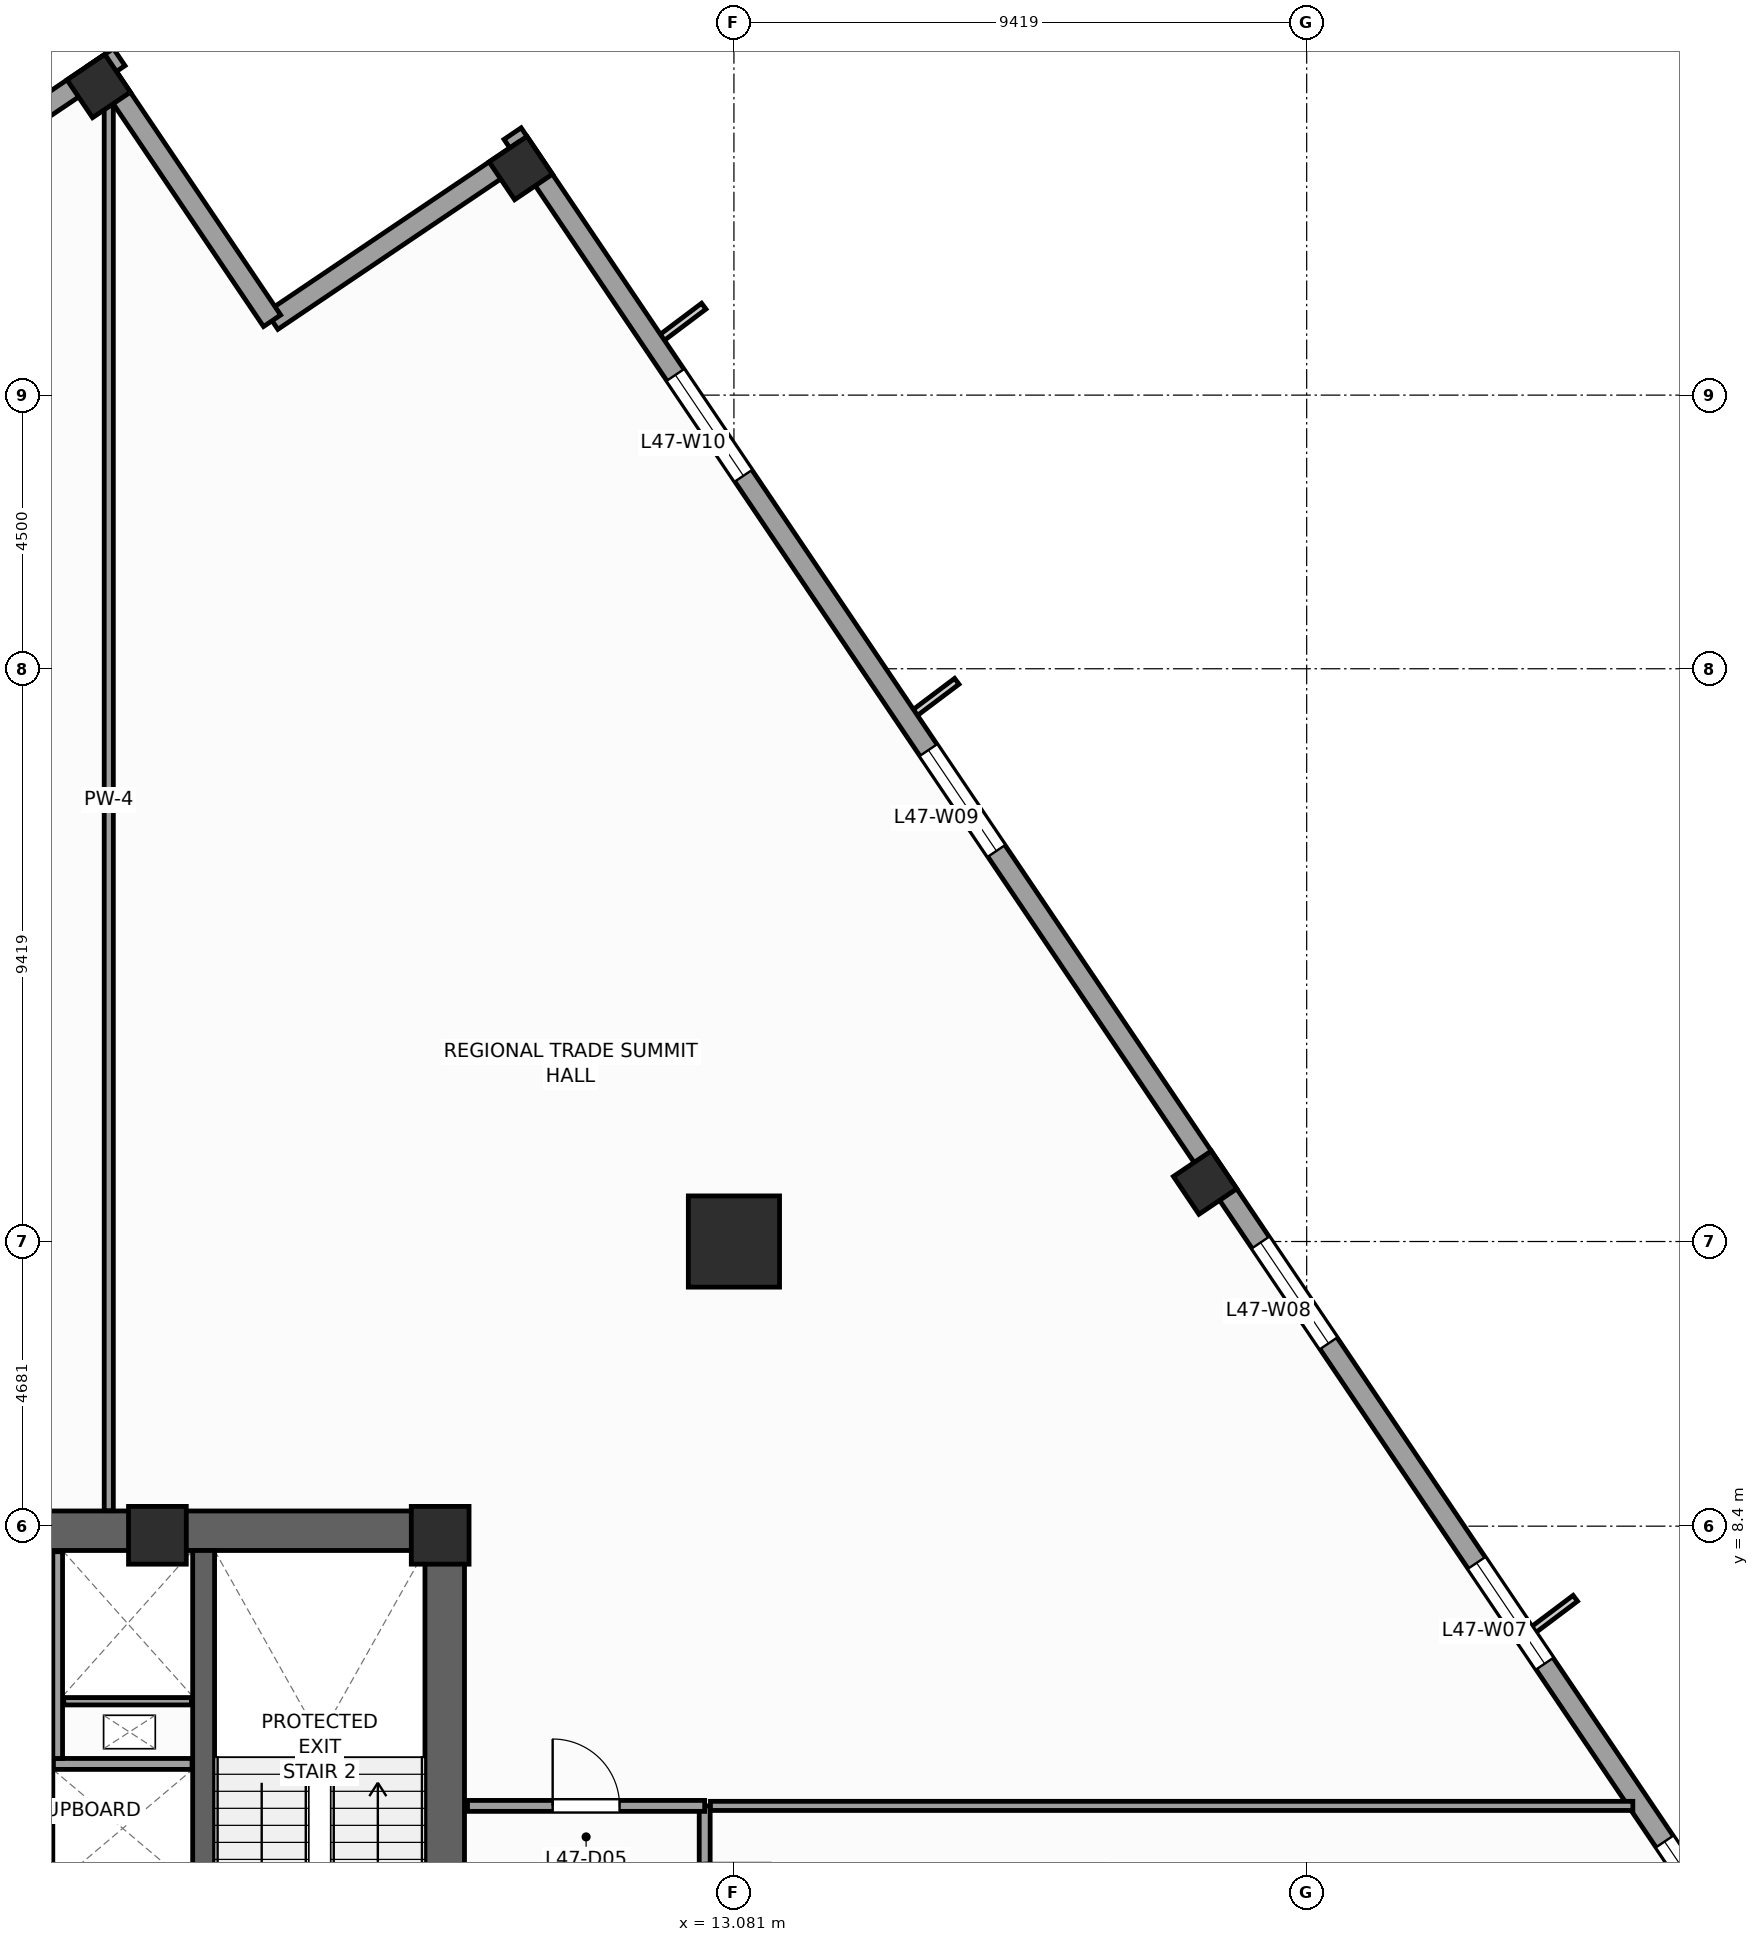
"""IFC4 building model, lengths in metres.
Left out: names, types, materials, properties, quantities, classifications, styles, units other than length and angle.
Written with IfcOpenShell. Run it as: python <this file> out.ifc"""

import sys

from ifc_helpers import new_model, si_unit, direction, frame, frame_2d, origin, origin_2d, place, context, subcontext, project, spatial, rectangle, extrude, source, transform, mapped, element, fill, save


model = new_model("IFC4")
c1 = context("Model", 3, precision=1e-05, world=origin(), true_north=direction((0.0, 1.0)))
c2 = subcontext(c1, "Body", "Model", "MODEL_VIEW")
j1 = project(units=[si_unit("LENGTHUNIT", "METRE"), si_unit("PLANEANGLEUNIT", "RADIAN")], contexts=[c1])
p1 = place(None, origin())
s1 = spatial("IfcSite", under=j1, at=p1, CompositionType="ELEMENT")
p2 = place(p1, origin())
s2 = spatial("IfcBuilding", under=s1, at=p2, CompositionType="ELEMENT")
p3 = place(p2, frame((0.0, 0.0, 196.4)))
s3 = spatial("IfcBuildingStorey", under=s2, at=p3, CompositionType="ELEMENT", Elevation=196.4)
p4 = place(p3, frame((-8.65, 8.325, 0.0), z_axis=(0.0, 0.0, 1.0), x_axis=(1.0, 0.0, 0.0)))
e1 = element("IfcWall", 1, at=p4, inside=s3, PredefinedType="SHEAR", context=c2, shape_type="SweptSolid", body=[
    extrude(rectangle(XDim=17.3, YDim=0.65, at=frame_2d((8.65, 0.0))), origin(), (0.0, 0.0, 1.0), 4.0),
])
p5 = place(p3, frame((8.325, -8.0, 0.0), z_axis=(0.0, 0.0, 1.0), x_axis=(0.0, 1.0, 0.0)))
e2 = element("IfcWall", 2, at=p5, inside=s3, PredefinedType="SHEAR", context=c2, shape_type="SweptSolid", body=[
    extrude(rectangle(XDim=16.0, YDim=0.65, at=frame_2d((8.0, 0.0))), origin(), (0.0, 0.0, 1.0), 4.0),
])
p6 = place(p5, frame((4.69, 0.0, 0.0)))
e3 = element("IfcOpeningElement", 3, at=p6, cuts=e2, PredefinedType="OPENING", context=c2, shape_type="SweptSolid", body=[
    extrude(rectangle(XDim=1.3, YDim=2.2, at=frame_2d((0.65, 1.1))), frame((0.0, 0.335, 0.0), z_axis=(0.0, -1.0, 0.0), x_axis=(1.0, 0.0, 0.0)), (0.0, 0.0, 1.0), 0.67),
])
p7 = place(p3, frame((4.36, -8.0, 0.0), z_axis=(0.0, 0.0, 1.0), x_axis=(0.0, 1.0, 0.0)))
e4 = element("IfcWall", 4, at=p7, inside=s3, PredefinedType="SHEAR", context=c2, shape_type="SweptSolid", body=[
    extrude(rectangle(XDim=16.0, YDim=0.36, at=frame_2d((8.0, 0.0))), origin(), (0.0, 0.0, 1.0), 4.0),
])
m1 = source(origin(), c2, "Body", "SweptSolid", [
    extrude(rectangle(XDim=0.95, YDim=0.95, at=origin_2d()), origin(), (0.0, 0.0, 1.0), 4.0),
])
for number, where, z_axis, x_axis in (
    (5, (8.25, 8.25, 0.0), (0.0, 0.0, 1.0), (1.0, 0.0, 0.0)),
    (6, (3.6, 8.25, 0.0), (0.0, 0.0, 1.0), (1.0, 0.0, 0.0)),
):
    element("IfcColumn", number, at=place(p3, frame(where, z_axis=z_axis, x_axis=x_axis)), inside=s3, PredefinedType="PILASTER", context=c2, shape_type="MappedRepresentation", body=[
        mapped(m1, transform((0.0, 0.0, 0.0), scale=1.0)),
    ])
m2 = source(origin(), c2, "Body", "SweptSolid", [
    extrude(rectangle(XDim=1.5, YDim=1.5, at=origin_2d()), origin(), (0.0, 0.0, 1.0), 4.0),
])
p8 = place(p3, frame((13.081, 13.081, 0.0), z_axis=(0.0, 0.0, 1.0), x_axis=(1.0, 0.0, 0.0)))
e7 = element("IfcColumn", 7, at=p8, inside=s3, PredefinedType="COLUMN", context=c2, shape_type="MappedRepresentation", body=[
    mapped(m2, transform((0.0, 0.0, 0.0), scale=1.0)),
])
m3 = source(origin(), c2, "Body", "SweptSolid", [
    extrude(rectangle(XDim=0.75, YDim=0.75, at=origin_2d()), origin(), (0.0, 0.0, 1.0), 4.0),
])
for number, where, z_axis, x_axis in (
    (8, (20.83, 14.05, 0.0), (0.0, 0.0, 1.0), (0.829, 0.559, 0.0)),
    (9, (9.576, 30.734, 0.0), (0.0, 0.0, 1.0), (0.829, 0.559, 0.0)),
    (10, (2.635, 32.083, 0.0), (0.0, 0.0, 1.0), (0.829, 0.559, 0.0)),
):
    element("IfcColumn", number, at=place(p3, frame(where, z_axis=z_axis, x_axis=x_axis)), inside=s3, PredefinedType="COLUMN", context=c2, shape_type="MappedRepresentation", body=[
        mapped(m3, transform((0.0, 0.0, 0.0), scale=1.0)),
    ])
p9 = place(p3, frame((32.558, -2.972, 0.0), z_axis=(0.0, 0.0, 1.0), x_axis=(-0.559194910251, 0.829036218961, 0.0)))
e11 = element("IfcWall", 11, at=p9, inside=s3, PredefinedType="STANDARD", context=c2, shape_type="SweptSolid", body=[
    extrude(rectangle(XDim=41.34, YDim=0.34, at=frame_2d((20.67, 0.0))), origin(), (0.0, 0.0, 1.0), 2.2),
])
p10 = place(p9, frame((5.461, 0.0, 0.67)))
e12 = element("IfcOpeningElement", 12, at=p10, cuts=e11, PredefinedType="OPENING", context=c2, shape_type="SweptSolid", body=[
    extrude(rectangle(XDim=2.0, YDim=1.45, at=frame_2d((1.0, 0.725))), frame((0.0, 0.18, 0.0), z_axis=(0.0, -1.0, 0.0), x_axis=(1.0, 0.0, 0.0)), (0.0, 0.0, 1.0), 0.36),
])
p11 = place(p9, frame((10.989, 0.0, 0.67)))
e13 = element("IfcOpeningElement", 13, at=p11, cuts=e11, PredefinedType="OPENING", context=c2, shape_type="SweptSolid", body=[
    extrude(rectangle(XDim=2.0, YDim=1.45, at=frame_2d((1.0, 0.725))), frame((0.0, 0.18, 0.0), z_axis=(0.0, -1.0, 0.0), x_axis=(1.0, 0.0, 0.0)), (0.0, 0.0, 1.0), 0.36),
])
p12 = place(p9, frame((17.343, 0.0, 0.67)))
e14 = element("IfcOpeningElement", 14, at=p12, cuts=e11, PredefinedType="OPENING", context=c2, shape_type="SweptSolid", body=[
    extrude(rectangle(XDim=2.0, YDim=1.45, at=frame_2d((1.0, 0.725))), frame((0.0, 0.18, 0.0), z_axis=(0.0, -1.0, 0.0), x_axis=(1.0, 0.0, 0.0)), (0.0, 0.0, 1.0), 0.36),
])
p13 = place(p9, frame((27.111, 0.0, 0.67)))
e15 = element("IfcOpeningElement", 15, at=p13, cuts=e11, PredefinedType="OPENING", context=c2, shape_type="SweptSolid", body=[
    extrude(rectangle(XDim=2.0, YDim=1.45, at=frame_2d((1.0, 0.725))), frame((0.0, 0.18, 0.0), z_axis=(0.0, -1.0, 0.0), x_axis=(1.0, 0.0, 0.0)), (0.0, 0.0, 1.0), 0.36),
])
p14 = place(p9, frame((34.552, 0.0, 0.67)))
e16 = element("IfcOpeningElement", 16, at=p14, cuts=e11, PredefinedType="OPENING", context=c2, shape_type="SweptSolid", body=[
    extrude(rectangle(XDim=2.0, YDim=1.45, at=frame_2d((1.0, 0.725))), frame((0.0, 0.18, 0.0), z_axis=(0.0, -1.0, 0.0), x_axis=(1.0, 0.0, 0.0)), (0.0, 0.0, 1.0), 0.36),
])
p15 = place(p3, frame((9.631, 31.019, 0.0), z_axis=(0.0, 0.0, 1.0), x_axis=(-0.829025804298, -0.559210350234, 0.0)))
e17 = element("IfcWall", 17, at=p15, inside=s3, PredefinedType="STANDARD", context=c2, shape_type="SweptSolid", body=[
    extrude(rectangle(XDim=5.0, YDim=0.34, at=frame_2d((2.5, 0.0))), origin(), (0.0, 0.0, 1.0), 3.6),
])
p16 = place(p3, frame((5.486, 28.223, 0.0), z_axis=(0.0, 0.0, 1.0), x_axis=(-0.559171107879, 0.82905227345, 0.0)))
e18 = element("IfcWall", 18, at=p16, inside=s3, PredefinedType="STANDARD", context=c2, shape_type="SweptSolid", body=[
    extrude(rectangle(XDim=5.17, YDim=0.34, at=frame_2d((2.585, 0.0))), origin(), (0.0, 0.0, 1.0), 2.2),
])
p17 = place(p3, frame((2.972, 32.558, 0.0), z_axis=(0.0, 0.0, 1.0), x_axis=(-0.829036218961, -0.559194910251, 0.0)))
e19 = element("IfcWall", 19, at=p17, inside=s3, PredefinedType="STANDARD", context=c2, shape_type="SweptSolid", body=[
    extrude(rectangle(XDim=41.34, YDim=0.34, at=frame_2d((20.67, 0.0))), origin(), (0.0, 0.0, 1.0), 2.2),
])
p18 = place(p17, frame((25.745, 0.0, 0.0)))
e20 = element("IfcOpeningElement", 20, at=p18, cuts=e19, PredefinedType="OPENING", context=c2, shape_type="SweptSolid", body=[
    extrude(rectangle(XDim=1.05, YDim=2.02, at=frame_2d((0.525, 1.01))), frame((0.0, 0.18, 0.0), z_axis=(0.0, -1.0, 0.0), x_axis=(1.0, 0.0, 0.0)), (0.0, 0.0, 1.0), 0.36),
])
p19 = place(p17, frame((3.961, 0.0, 0.67)))
e21 = element("IfcOpeningElement", 21, at=p19, cuts=e19, PredefinedType="OPENING", context=c2, shape_type="SweptSolid", body=[
    extrude(rectangle(XDim=2.0, YDim=1.45, at=frame_2d((1.0, 0.725))), frame((0.0, 0.18, 0.0), z_axis=(0.0, -1.0, 0.0), x_axis=(1.0, 0.0, 0.0)), (0.0, 0.0, 1.0), 0.36),
])
p20 = place(p17, frame((10.989, 0.0, 0.67)))
e22 = element("IfcOpeningElement", 22, at=p20, cuts=e19, PredefinedType="OPENING", context=c2, shape_type="SweptSolid", body=[
    extrude(rectangle(XDim=2.0, YDim=1.45, at=frame_2d((1.0, 0.725))), frame((0.0, 0.18, 0.0), z_axis=(0.0, -1.0, 0.0), x_axis=(1.0, 0.0, 0.0)), (0.0, 0.0, 1.0), 0.36),
])
p21 = place(p17, frame((17.343, 0.0, 0.67)))
e23 = element("IfcOpeningElement", 23, at=p21, cuts=e19, PredefinedType="OPENING", context=c2, shape_type="SweptSolid", body=[
    extrude(rectangle(XDim=2.0, YDim=1.45, at=frame_2d((1.0, 0.725))), frame((0.0, 0.18, 0.0), z_axis=(0.0, -1.0, 0.0), x_axis=(1.0, 0.0, 0.0)), (0.0, 0.0, 1.0), 0.36),
])
p22 = place(p17, frame((27.861, 0.0, 0.67)))
e24 = element("IfcOpeningElement", 24, at=p22, cuts=e19, PredefinedType="OPENING", context=c2, shape_type="SweptSolid", body=[
    extrude(rectangle(XDim=2.0, YDim=1.45, at=frame_2d((1.0, 0.725))), frame((0.0, 0.18, 0.0), z_axis=(0.0, -1.0, 0.0), x_axis=(1.0, 0.0, 0.0)), (0.0, 0.0, 1.0), 0.36),
])
p23 = place(p17, frame((34.552, 0.0, 0.67)))
e25 = element("IfcOpeningElement", 25, at=p23, cuts=e19, PredefinedType="OPENING", context=c2, shape_type="SweptSolid", body=[
    extrude(rectangle(XDim=2.0, YDim=1.45, at=frame_2d((1.0, 0.725))), frame((0.0, 0.18, 0.0), z_axis=(0.0, -1.0, 0.0), x_axis=(1.0, 0.0, 0.0)), (0.0, 0.0, 1.0), 0.36),
])
p24 = place(p3, frame((1.79, -7.98, 0.0), z_axis=(0.0, 0.0, 1.0), x_axis=(0.0, 1.0, 0.0)))
e26 = element("IfcWall", 26, at=p24, inside=s3, PredefinedType="PARTITIONING", context=c2, shape_type="SweptSolid", body=[
    extrude(rectangle(XDim=12.38, YDim=0.18, at=frame_2d((6.19, 0.0))), origin(), (0.0, 0.0, 1.0), 3.6),
])
p25 = place(p24, frame((4.6, 0.0, 0.0)))
e27 = element("IfcOpeningElement", 27, at=p25, cuts=e26, PredefinedType="OPENING", context=c2, shape_type="SweptSolid", body=[
    extrude(rectangle(XDim=1.1, YDim=2.2, at=frame_2d((0.55, 1.1))), frame((0.0, 0.1, 0.0), z_axis=(0.0, -1.0, 0.0), x_axis=(1.0, 0.0, 0.0)), (0.0, 0.0, 1.0), 0.2),
])
p26 = place(p24, frame((6.66, 0.0, 0.0)))
e28 = element("IfcOpeningElement", 28, at=p26, cuts=e26, PredefinedType="OPENING", context=c2, shape_type="SweptSolid", body=[
    extrude(rectangle(XDim=1.1, YDim=2.2, at=frame_2d((0.55, 1.1))), frame((0.0, 0.1, 0.0), z_axis=(0.0, -1.0, 0.0), x_axis=(1.0, 0.0, 0.0)), (0.0, 0.0, 1.0), 0.2),
])
p27 = place(p24, frame((1.4, 0.0, 0.0)))
e29 = element("IfcOpeningElement", 29, at=p27, cuts=e26, PredefinedType="OPENING", context=c2, shape_type="SweptSolid", body=[
    extrude(rectangle(XDim=1.15, YDim=2.25, at=frame_2d((0.575, 1.125))), frame((0.0, 0.1, 0.0), z_axis=(0.0, -1.0, 0.0), x_axis=(1.0, 0.0, 0.0)), (0.0, 0.0, 1.0), 0.2),
])
p28 = place(p3, frame((1.89, 4.49, 0.0), z_axis=(0.0, 0.0, 1.0), x_axis=(1.0, 0.0, 0.0)))
e30 = element("IfcWall", 30, at=p28, inside=s3, PredefinedType="PARTITIONING", context=c2, shape_type="SweptSolid", body=[
    extrude(rectangle(XDim=2.28, YDim=0.18, at=frame_2d((1.14, 0.0))), origin(), (0.0, 0.0, 1.0), 3.6),
])
p29 = place(p3, frame((1.96, 4.58, 0.0), z_axis=(0.0, 0.0, 1.0), x_axis=(0.0, 1.0, 0.0)))
e31 = element("IfcWall", 31, at=p29, inside=s3, PredefinedType="PARTITIONING", context=c2, shape_type="SweptSolid", body=[
    extrude(rectangle(XDim=3.4, YDim=0.16, at=frame_2d((1.7, 0.0))), origin(), (0.0, 0.0, 1.0), 3.6),
])
p30 = place(p3, frame((2.06, 5.52, 0.0), z_axis=(0.0, 0.0, 1.0), x_axis=(1.0, 0.0, 0.0)))
e32 = element("IfcWall", 32, at=p30, inside=s3, PredefinedType="PARTITIONING", context=c2, shape_type="SweptSolid", body=[
    extrude(rectangle(XDim=2.1, YDim=0.12, at=frame_2d((1.05, 0.0))), origin(), (0.0, 0.0, 1.0), 3.6),
])
p31 = place(p3, frame((12.6, -11.45, 0.0), z_axis=(0.0, 0.0, 1.0), x_axis=(0.0, 1.0, 0.0)))
e33 = element("IfcWall", 33, at=p31, inside=s3, PredefinedType="PARTITIONING", context=c2, shape_type="SweptSolid", body=[
    extrude(rectangle(XDim=15.25, YDim=0.18, at=frame_2d((7.625, 0.0))), origin(), (0.0, 0.0, 1.0), 2.56),
])
p32 = place(p31, frame((13.21, 0.0, 0.0)))
e34 = element("IfcOpeningElement", 34, at=p32, cuts=e33, PredefinedType="OPENING", context=c2, shape_type="SweptSolid", body=[
    extrude(rectangle(XDim=1.1, YDim=2.2, at=frame_2d((0.55, 1.1))), frame((0.0, 0.1, 0.0), z_axis=(0.0, -1.0, 0.0), x_axis=(1.0, 0.0, 0.0)), (0.0, 0.0, 1.0), 0.2),
])
p33 = place(p31, frame((5.5, 0.0, 0.0)))
e35 = element("IfcOpeningElement", 35, at=p33, cuts=e33, PredefinedType="OPENING", context=c2, shape_type="SweptSolid", body=[
    extrude(rectangle(XDim=1.1, YDim=2.2, at=frame_2d((0.55, 1.1))), frame((0.0, 0.1, 0.0), z_axis=(0.0, -1.0, 0.0), x_axis=(1.0, 0.0, 0.0)), (0.0, 0.0, 1.0), 0.2),
])
p34 = place(p31, frame((10.175, 0.0, 0.0)))
e36 = element("IfcOpeningElement", 36, at=p34, cuts=e33, PredefinedType="OPENING", context=c2, shape_type="SweptSolid", body=[
    extrude(rectangle(XDim=1.1, YDim=2.2, at=frame_2d((0.55, 1.1))), frame((0.0, 0.1, 0.0), z_axis=(0.0, -1.0, 0.0), x_axis=(1.0, 0.0, 0.0)), (0.0, 0.0, 1.0), 0.2),
])
p35 = place(p3, frame((8.7, 3.8, 0.0), z_axis=(0.0, 0.0, 1.0), x_axis=(1.0, 0.0, 0.0)))
e37 = element("IfcWall", 37, at=p35, inside=s3, PredefinedType="PARTITIONING", context=c2, shape_type="SweptSolid", body=[
    extrude(rectangle(XDim=3.9, YDim=0.18, at=frame_2d((1.95, 0.0))), origin(), (0.0, 0.0, 1.0), 3.6),
])
p36 = place(p35, frame((1.4, 0.0, 0.0)))
e38 = element("IfcOpeningElement", 38, at=p36, cuts=e37, PredefinedType="OPENING", context=c2, shape_type="SweptSolid", body=[
    extrude(rectangle(XDim=1.1, YDim=2.2, at=frame_2d((0.55, 1.1))), frame((0.0, 0.1, 0.0), z_axis=(0.0, -1.0, 0.0), x_axis=(1.0, 0.0, 0.0)), (0.0, 0.0, 1.0), 0.2),
])
p37 = place(p3, frame((2.8, 8.655, 0.0), z_axis=(0.0, 0.0, 1.0), x_axis=(0.0, 1.0, 0.0)))
e39 = element("IfcWall", 39, at=p37, inside=s3, PredefinedType="PARTITIONING", context=c2, shape_type="SweptSolid", body=[
    extrude(rectangle(XDim=23.362, YDim=0.15, at=frame_2d((11.681, 0.0))), origin(), (0.0, 0.0, 1.0), 3.6),
])
p38 = place(p3, frame((12.695, 3.8, 0.0), z_axis=(0.0, 0.0, 1.0), x_axis=(1.0, 0.0, 0.0)))
e40 = element("IfcWall", 40, at=p38, inside=s3, PredefinedType="PARTITIONING", context=c2, shape_type="SweptSolid", body=[
    extrude(rectangle(XDim=15.169, YDim=0.15, at=frame_2d((7.584, 0.0))), origin(), (0.0, 0.0, 1.0), 3.6),
])
m4 = source(origin(), c2, "Body", "SweptSolid", [
    extrude(rectangle(XDim=2.0, YDim=1.45, at=frame_2d((1.0, 0.725))), frame((0.0, 0.03, 0.0), z_axis=(0.0, -1.0, 0.0), x_axis=(1.0, 0.0, 0.0)), (0.0, 0.0, 1.0), 0.06),
])
p39 = place(p10, origin())
e41 = element("IfcWindow", 41, at=p39, inside=s3, PartitioningType="SINGLE_PANEL", PredefinedType="WINDOW", context=c2, shape_type="MappedRepresentation", body=[
    mapped(m4, transform((0.0, 0.0, 0.0), scale=1.0)),
])
fill(e12, e41)
p40 = place(p11, origin())
e42 = element("IfcWindow", 42, at=p40, inside=s3, PartitioningType="SINGLE_PANEL", PredefinedType="WINDOW", context=c2, shape_type="MappedRepresentation", body=[
    mapped(m4, transform((0.0, 0.0, 0.0), scale=1.0)),
])
fill(e13, e42)
p41 = place(p12, origin())
e43 = element("IfcWindow", 43, at=p41, inside=s3, PartitioningType="SINGLE_PANEL", PredefinedType="WINDOW", context=c2, shape_type="MappedRepresentation", body=[
    mapped(m4, transform((0.0, 0.0, 0.0), scale=1.0)),
])
fill(e14, e43)
p42 = place(p13, origin())
e44 = element("IfcWindow", 44, at=p42, inside=s3, PartitioningType="SINGLE_PANEL", PredefinedType="WINDOW", context=c2, shape_type="MappedRepresentation", body=[
    mapped(m4, transform((0.0, 0.0, 0.0), scale=1.0)),
])
fill(e15, e44)
p43 = place(p14, origin())
e45 = element("IfcWindow", 45, at=p43, inside=s3, PartitioningType="SINGLE_PANEL", PredefinedType="WINDOW", context=c2, shape_type="MappedRepresentation", body=[
    mapped(m4, transform((0.0, 0.0, 0.0), scale=1.0)),
])
fill(e16, e45)
m5 = source(origin(), c2, "Body", "SweptSolid", [
    extrude(rectangle(XDim=1.1, YDim=2.2, at=frame_2d((0.55, 1.1))), frame((0.0, 0.025, 0.0), z_axis=(0.0, -1.0, 0.0), x_axis=(1.0, 0.0, 0.0)), (0.0, 0.0, 1.0), 0.05),
])
p44 = place(p36, origin())
e46 = element("IfcDoor", 46, at=p44, inside=s3, OperationType="SINGLE_SWING_LEFT", PredefinedType="DOOR", context=c2, shape_type="MappedRepresentation", body=[
    mapped(m5, transform((0.0, 0.0, 0.0), scale=1.0)),
])
fill(e38, e46)
save(model, sys.argv[1])
